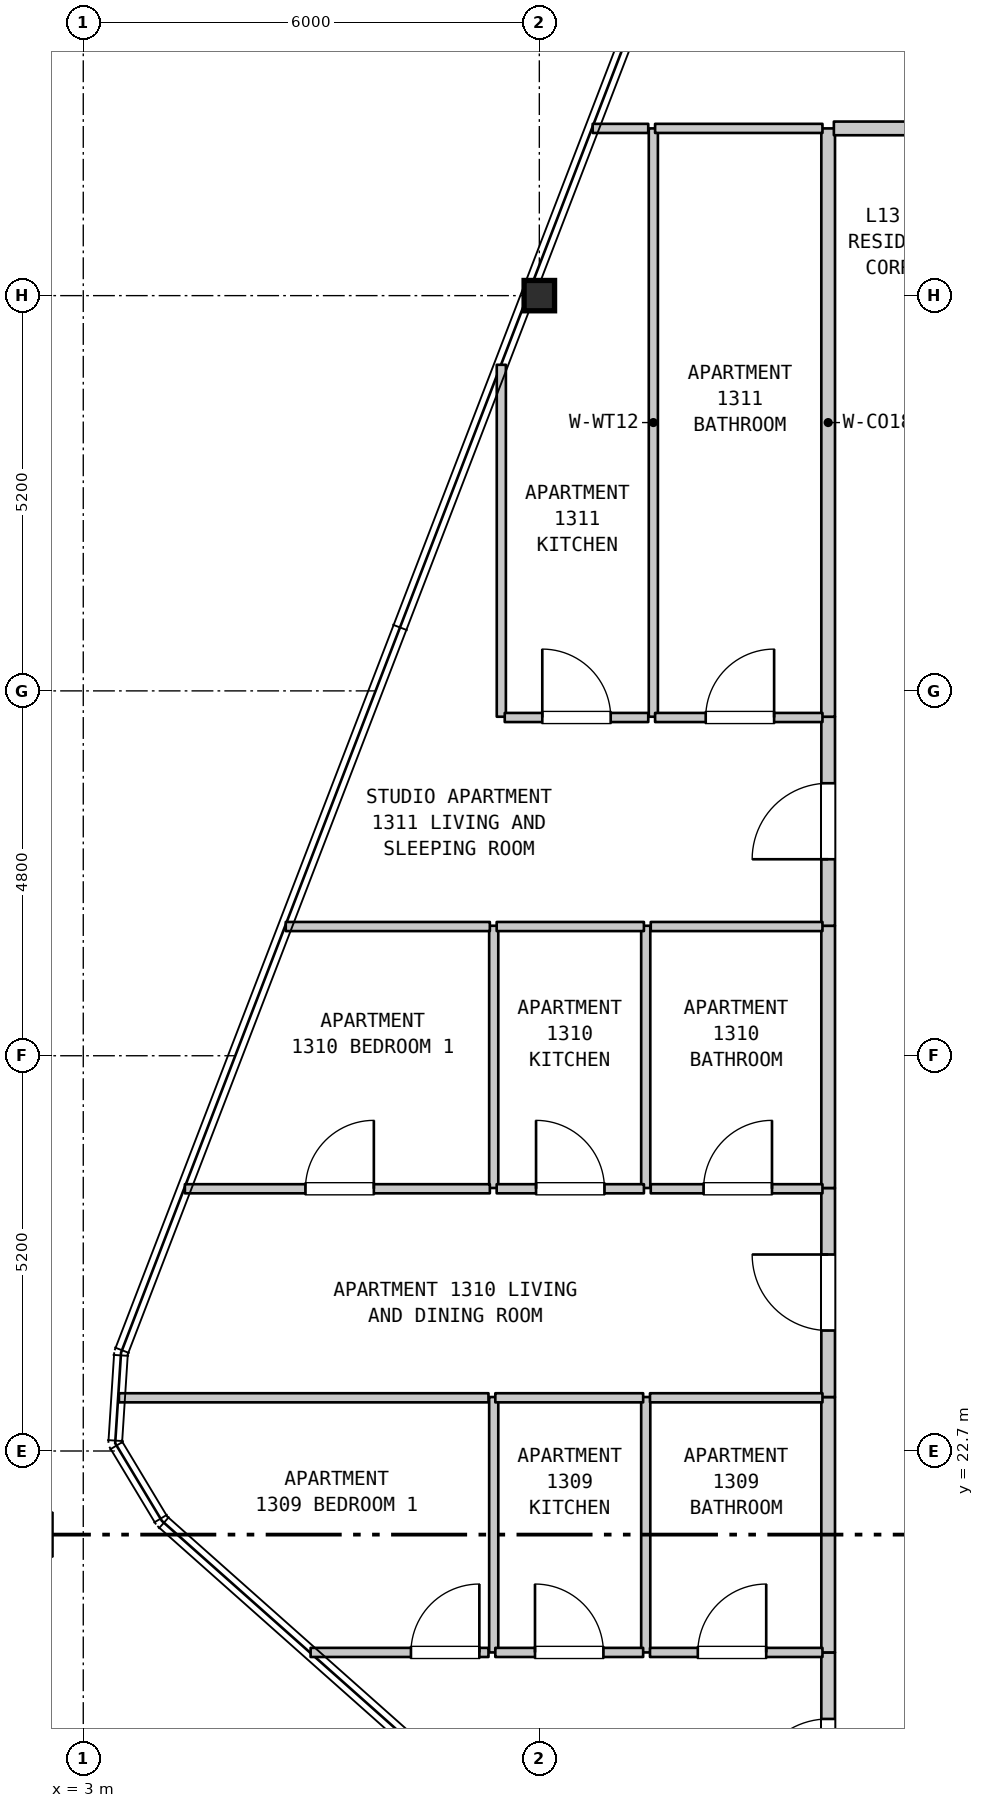
"""IFC4 building model, lengths in metres.
Left out: names, types, materials, properties, quantities, classifications, styles, units other than length and angle.
Written with IfcOpenShell. Run it as: python <this file> out.ifc"""

import sys

from ifc_helpers import new_model, si_unit, direction, frame, frame_2d, origin, origin_2d, place, context, subcontext, project, spatial, rectangle, i_section, extrude, element, fill, save


model = new_model("IFC4")
c1 = context("Model", 3, precision=1e-05, world=origin(), true_north=direction((0.0, 1.0)))
c2 = subcontext(c1, "Body", "Model", "MODEL_VIEW")
j1 = project(units=[si_unit("LENGTHUNIT", "METRE"), si_unit("PLANEANGLEUNIT", "RADIAN")], contexts=[c1])
p1 = place(None, origin())
s1 = spatial("IfcSite", under=j1, at=p1, CompositionType="ELEMENT")
p2 = place(p1, origin())
s2 = spatial("IfcBuilding", under=s1, at=p2, CompositionType="ELEMENT")
p3 = place(p2, frame((0.0, 0.0, 57.3)))
s3 = spatial("IfcBuildingStorey", under=s2, at=p3, CompositionType="ELEMENT", Elevation=57.3)
p4 = place(p3, frame((9.0, 37.9, 0.0), z_axis=(0.0, 0.0, 1.0), x_axis=(1.0, 0.0, 0.0)))
e1 = element("IfcColumn", 1, at=p4, inside=s3, PredefinedType="COLUMN", context=c2, shape_type="SweptSolid", body=[
    extrude(i_section(OverallWidth=0.401, OverallDepth=0.399, WebThickness=0.025, FlangeThickness=0.04, FilletRadius=0.015, at=origin_2d()), origin(), (0.0, 0.0, 1.0), 3.7),
])
p5 = place(p3, frame((8.4, 20.05, 0.0), z_axis=(0.0, 0.0, 1.0), x_axis=(0.0, 1.0, 0.0)))
e2 = element("IfcWall", 2, at=p5, inside=s3, PredefinedType="PARTITIONING", context=c2, shape_type="SweptSolid", body=[
    extrude(rectangle(XDim=3.36, YDim=0.12, at=frame_2d((1.68, 0.0))), origin(), (0.0, 0.0, 1.0), 3.28),
])
p6 = place(p3, frame((8.4, 26.16, 0.0), z_axis=(0.0, 0.0, 1.0), x_axis=(0.0, 1.0, 0.0)))
e3 = element("IfcWall", 3, at=p6, inside=s3, PredefinedType="PARTITIONING", context=c2, shape_type="SweptSolid", body=[
    extrude(rectangle(XDim=3.45, YDim=0.12, at=frame_2d((1.725, 0.0))), origin(), (0.0, 0.0, 1.0), 3.28),
])
p7 = place(p3, frame((8.5, 32.36, 0.0), z_axis=(0.0, 0.0, 1.0), x_axis=(0.0, 1.0, 0.0)))
e4 = element("IfcWall", 4, at=p7, inside=s3, PredefinedType="PARTITIONING", context=c2, shape_type="SweptSolid", body=[
    extrude(rectangle(XDim=4.63, YDim=0.12, at=frame_2d((2.315, 0.0))), origin(), (0.0, 0.0, 1.0), 3.28),
])
p8 = place(p3, frame((10.4, 20.05, 0.0), z_axis=(0.0, 0.0, 1.0), x_axis=(0.0, 1.0, 0.0)))
e5 = element("IfcWall", 5, at=p8, inside=s3, PredefinedType="PARTITIONING", context=c2, shape_type="SweptSolid", body=[
    extrude(rectangle(XDim=3.36, YDim=0.12, at=frame_2d((1.68, 0.0))), origin(), (0.0, 0.0, 1.0), 3.28),
])
p9 = place(p3, frame((10.4, 26.16, 0.0), z_axis=(0.0, 0.0, 1.0), x_axis=(0.0, 1.0, 0.0)))
e6 = element("IfcWall", 6, at=p9, inside=s3, PredefinedType="PARTITIONING", context=c2, shape_type="SweptSolid", body=[
    extrude(rectangle(XDim=3.45, YDim=0.12, at=frame_2d((1.725, 0.0))), origin(), (0.0, 0.0, 1.0), 3.28),
])
p10 = place(p3, frame((10.5, 32.36, 0.0), z_axis=(0.0, 0.0, 1.0), x_axis=(0.0, 1.0, 0.0)))
e7 = element("IfcWall", 7, at=p10, inside=s3, PredefinedType="PARTITIONING", context=c2, shape_type="SweptSolid", body=[
    extrude(rectangle(XDim=7.74, YDim=0.12, at=frame_2d((3.87, 0.0))), origin(), (0.0, 0.0, 1.0), 3.28),
])
p11 = place(p3, frame((12.8, 17.3, 0.0), z_axis=(0.0, 0.0, 1.0), x_axis=(0.0, 1.0, 0.0)))
e8 = element("IfcWall", 8, at=p11, inside=s3, PredefinedType="STANDARD", context=c2, shape_type="SweptSolid", body=[
    extrude(rectangle(XDim=2.75, YDim=0.18, at=frame_2d((1.375, 0.0))), origin(), (0.0, 0.0, 1.0), 3.28),
])
p12 = place(p11, frame((0.875, 0.0, 0.0)))
e9 = element("IfcOpeningElement", 9, at=p12, cuts=e8, PredefinedType="OPENING", context=c2, shape_type="SweptSolid", body=[
    extrude(rectangle(XDim=1.0, YDim=2.15, at=frame_2d((0.5, 1.075))), frame((0.0, 0.1, 0.0), z_axis=(0.0, -1.0, 0.0), x_axis=(1.0, 0.0, 0.0)), (0.0, 0.0, 1.0), 0.2),
])
p13 = place(p3, frame((12.8, 20.05, 0.0), z_axis=(0.0, 0.0, 1.0), x_axis=(0.0, 1.0, 0.0)))
e10 = element("IfcWall", 10, at=p13, inside=s3, PredefinedType="STANDARD", context=c2, shape_type="SweptSolid", body=[
    extrude(rectangle(XDim=3.36, YDim=0.18, at=frame_2d((1.68, 0.0))), origin(), (0.0, 0.0, 1.0), 3.28),
])
p14 = place(p3, frame((12.8, 23.41, 0.0), z_axis=(0.0, 0.0, 1.0), x_axis=(0.0, 1.0, 0.0)))
e11 = element("IfcWall", 11, at=p14, inside=s3, PredefinedType="STANDARD", context=c2, shape_type="SweptSolid", body=[
    extrude(rectangle(XDim=2.75, YDim=0.18, at=frame_2d((1.375, 0.0))), origin(), (0.0, 0.0, 1.0), 3.28),
])
p15 = place(p14, frame((0.875, 0.0, 0.0)))
e12 = element("IfcOpeningElement", 12, at=p15, cuts=e11, PredefinedType="OPENING", context=c2, shape_type="SweptSolid", body=[
    extrude(rectangle(XDim=1.0, YDim=2.15, at=frame_2d((0.5, 1.075))), frame((0.0, 0.1, 0.0), z_axis=(0.0, -1.0, 0.0), x_axis=(1.0, 0.0, 0.0)), (0.0, 0.0, 1.0), 0.2),
])
p16 = place(p3, frame((12.8, 26.16, 0.0), z_axis=(0.0, 0.0, 1.0), x_axis=(0.0, 1.0, 0.0)))
e13 = element("IfcWall", 13, at=p16, inside=s3, PredefinedType="STANDARD", context=c2, shape_type="SweptSolid", body=[
    extrude(rectangle(XDim=3.45, YDim=0.18, at=frame_2d((1.725, 0.0))), origin(), (0.0, 0.0, 1.0), 3.28),
])
p17 = place(p3, frame((12.8, 29.61, 0.0), z_axis=(0.0, 0.0, 1.0), x_axis=(0.0, 1.0, 0.0)))
e14 = element("IfcWall", 14, at=p17, inside=s3, PredefinedType="STANDARD", context=c2, shape_type="SweptSolid", body=[
    extrude(rectangle(XDim=2.75, YDim=0.18, at=frame_2d((1.375, 0.0))), origin(), (0.0, 0.0, 1.0), 3.28),
])
p18 = place(p17, frame((0.875, 0.0, 0.0)))
e15 = element("IfcOpeningElement", 15, at=p18, cuts=e14, PredefinedType="OPENING", context=c2, shape_type="SweptSolid", body=[
    extrude(rectangle(XDim=1.0, YDim=2.15, at=frame_2d((0.5, 1.075))), frame((0.0, 0.1, 0.0), z_axis=(0.0, -1.0, 0.0), x_axis=(1.0, 0.0, 0.0)), (0.0, 0.0, 1.0), 0.2),
])
p19 = place(p3, frame((12.8, 32.36, 0.0), z_axis=(0.0, 0.0, 1.0), x_axis=(0.0, 1.0, 0.0)))
e16 = element("IfcWall", 16, at=p19, inside=s3, PredefinedType="STANDARD", context=c2, shape_type="SweptSolid", body=[
    extrude(rectangle(XDim=7.74, YDim=0.18, at=frame_2d((3.87, 0.0))), origin(), (0.0, 0.0, 1.0), 3.28),
])
p20 = place(p3, frame((5.991, 20.05, 0.0), z_axis=(0.0, 0.0, 1.0), x_axis=(1.0, 0.0, 0.0)))
e17 = element("IfcWall", 17, at=p20, inside=s3, PredefinedType="PARTITIONING", context=c2, shape_type="SweptSolid", body=[
    extrude(rectangle(XDim=2.34, YDim=0.12, at=frame_2d((1.17, 0.0))), origin(), (0.0, 0.0, 1.0), 3.28),
])
p21 = place(p20, frame((1.32, 0.0, 0.0)))
e18 = element("IfcOpeningElement", 18, at=p21, cuts=e17, PredefinedType="OPENING", context=c2, shape_type="SweptSolid", body=[
    extrude(rectangle(XDim=0.9, YDim=2.15, at=frame_2d((0.45, 1.075))), frame((0.0, 0.07, 0.0), z_axis=(0.0, -1.0, 0.0), x_axis=(1.0, 0.0, 0.0)), (0.0, 0.0, 1.0), 0.14),
])
p22 = place(p3, frame((8.421, 20.05, 0.0), z_axis=(0.0, 0.0, 1.0), x_axis=(1.0, 0.0, 0.0)))
e19 = element("IfcWall", 19, at=p22, inside=s3, PredefinedType="PARTITIONING", context=c2, shape_type="SweptSolid", body=[
    extrude(rectangle(XDim=1.945, YDim=0.12, at=frame_2d((0.973, 0.0))), origin(), (0.0, 0.0, 1.0), 3.28),
])
p23 = place(p22, frame((0.522, 0.0, 0.0)))
e20 = element("IfcOpeningElement", 20, at=p23, cuts=e19, PredefinedType="OPENING", context=c2, shape_type="SweptSolid", body=[
    extrude(rectangle(XDim=0.9, YDim=2.15, at=frame_2d((0.45, 1.075))), frame((0.0, 0.07, 0.0), z_axis=(0.0, -1.0, 0.0), x_axis=(1.0, 0.0, 0.0)), (0.0, 0.0, 1.0), 0.14),
])
p24 = place(p3, frame((10.456, 20.05, 0.0), z_axis=(0.0, 0.0, 1.0), x_axis=(1.0, 0.0, 0.0)))
e21 = element("IfcWall", 21, at=p24, inside=s3, PredefinedType="PARTITIONING", context=c2, shape_type="SweptSolid", body=[
    extrude(rectangle(XDim=2.269, YDim=0.12, at=frame_2d((1.135, 0.0))), origin(), (0.0, 0.0, 1.0), 3.28),
])
p25 = place(p24, frame((0.629, 0.0, 0.0)))
e22 = element("IfcOpeningElement", 22, at=p25, cuts=e21, PredefinedType="OPENING", context=c2, shape_type="SweptSolid", body=[
    extrude(rectangle(XDim=0.9, YDim=2.1, at=frame_2d((0.45, 1.05))), frame((0.0, 0.07, 0.0), z_axis=(0.0, -1.0, 0.0), x_axis=(1.0, 0.0, 0.0)), (0.0, 0.0, 1.0), 0.14),
])
p26 = place(p3, frame((3.469, 23.4, 0.0), z_axis=(0.0, 0.0, 1.0), x_axis=(1.0, 0.0, 0.0)))
e23 = element("IfcWall", 23, at=p26, inside=s3, PredefinedType="PARTITIONING", context=c2, shape_type="SweptSolid", body=[
    extrude(rectangle(XDim=4.862, YDim=0.12, at=frame_2d((2.431, 0.0))), origin(), (0.0, 0.0, 1.0), 3.28),
])
p27 = place(p3, frame((8.421, 23.4, 0.0), z_axis=(0.0, 0.0, 1.0), x_axis=(1.0, 0.0, 0.0)))
e24 = element("IfcWall", 24, at=p27, inside=s3, PredefinedType="PARTITIONING", context=c2, shape_type="SweptSolid", body=[
    extrude(rectangle(XDim=1.945, YDim=0.12, at=frame_2d((0.973, 0.0))), origin(), (0.0, 0.0, 1.0), 3.28),
])
p28 = place(p3, frame((10.456, 23.4, 0.0), z_axis=(0.0, 0.0, 1.0), x_axis=(1.0, 0.0, 0.0)))
e25 = element("IfcWall", 25, at=p28, inside=s3, PredefinedType="PARTITIONING", context=c2, shape_type="SweptSolid", body=[
    extrude(rectangle(XDim=2.269, YDim=0.12, at=frame_2d((1.135, 0.0))), origin(), (0.0, 0.0, 1.0), 3.28),
])
p29 = place(p3, frame((4.337, 26.15, 0.0), z_axis=(0.0, 0.0, 1.0), x_axis=(1.0, 0.0, 0.0)))
e26 = element("IfcWall", 26, at=p29, inside=s3, PredefinedType="PARTITIONING", context=c2, shape_type="SweptSolid", body=[
    extrude(rectangle(XDim=4.012, YDim=0.12, at=frame_2d((2.006, 0.0))), origin(), (0.0, 0.0, 1.0), 3.28),
])
p30 = place(p29, frame((1.586, 0.0, 0.0)))
e27 = element("IfcOpeningElement", 27, at=p30, cuts=e26, PredefinedType="OPENING", context=c2, shape_type="SweptSolid", body=[
    extrude(rectangle(XDim=0.9, YDim=2.15, at=frame_2d((0.45, 1.075))), frame((0.0, 0.07, 0.0), z_axis=(0.0, -1.0, 0.0), x_axis=(1.0, 0.0, 0.0)), (0.0, 0.0, 1.0), 0.14),
])
p31 = place(p3, frame((8.439, 26.15, 0.0), z_axis=(0.0, 0.0, 1.0), x_axis=(1.0, 0.0, 0.0)))
e28 = element("IfcWall", 28, at=p31, inside=s3, PredefinedType="PARTITIONING", context=c2, shape_type="SweptSolid", body=[
    extrude(rectangle(XDim=1.937, YDim=0.12, at=frame_2d((0.969, 0.0))), origin(), (0.0, 0.0, 1.0), 3.28),
])
p32 = place(p31, frame((0.518, 0.0, 0.0)))
e29 = element("IfcOpeningElement", 29, at=p32, cuts=e28, PredefinedType="OPENING", context=c2, shape_type="SweptSolid", body=[
    extrude(rectangle(XDim=0.9, YDim=2.15, at=frame_2d((0.45, 1.075))), frame((0.0, 0.07, 0.0), z_axis=(0.0, -1.0, 0.0), x_axis=(1.0, 0.0, 0.0)), (0.0, 0.0, 1.0), 0.14),
])
p33 = place(p3, frame((10.466, 26.15, 0.0), z_axis=(0.0, 0.0, 1.0), x_axis=(1.0, 0.0, 0.0)))
e30 = element("IfcWall", 30, at=p33, inside=s3, PredefinedType="PARTITIONING", context=c2, shape_type="SweptSolid", body=[
    extrude(rectangle(XDim=2.259, YDim=0.12, at=frame_2d((1.129, 0.0))), origin(), (0.0, 0.0, 1.0), 3.28),
])
p34 = place(p33, frame((0.695, 0.0, 0.0)))
e31 = element("IfcOpeningElement", 31, at=p34, cuts=e30, PredefinedType="OPENING", context=c2, shape_type="SweptSolid", body=[
    extrude(rectangle(XDim=0.9, YDim=2.1, at=frame_2d((0.45, 1.05))), frame((0.0, 0.07, 0.0), z_axis=(0.0, -1.0, 0.0), x_axis=(1.0, 0.0, 0.0)), (0.0, 0.0, 1.0), 0.14),
])
p35 = place(p3, frame((5.664, 29.6, 0.0), z_axis=(0.0, 0.0, 1.0), x_axis=(1.0, 0.0, 0.0)))
e32 = element("IfcWall", 32, at=p35, inside=s3, PredefinedType="PARTITIONING", context=c2, shape_type="SweptSolid", body=[
    extrude(rectangle(XDim=2.685, YDim=0.12, at=frame_2d((1.343, 0.0))), origin(), (0.0, 0.0, 1.0), 3.28),
])
p36 = place(p3, frame((8.439, 29.6, 0.0), z_axis=(0.0, 0.0, 1.0), x_axis=(1.0, 0.0, 0.0)))
e33 = element("IfcWall", 33, at=p36, inside=s3, PredefinedType="PARTITIONING", context=c2, shape_type="SweptSolid", body=[
    extrude(rectangle(XDim=1.937, YDim=0.12, at=frame_2d((0.969, 0.0))), origin(), (0.0, 0.0, 1.0), 3.28),
])
p37 = place(p3, frame((10.466, 29.6, 0.0), z_axis=(0.0, 0.0, 1.0), x_axis=(1.0, 0.0, 0.0)))
e34 = element("IfcWall", 34, at=p37, inside=s3, PredefinedType="PARTITIONING", context=c2, shape_type="SweptSolid", body=[
    extrude(rectangle(XDim=2.259, YDim=0.12, at=frame_2d((1.129, 0.0))), origin(), (0.0, 0.0, 1.0), 3.28),
])
p38 = place(p3, frame((8.545, 32.35, 0.0), z_axis=(0.0, 0.0, 1.0), x_axis=(1.0, 0.0, 0.0)))
e35 = element("IfcWall", 35, at=p38, inside=s3, PredefinedType="PARTITIONING", context=c2, shape_type="SweptSolid", body=[
    extrude(rectangle(XDim=1.888, YDim=0.12, at=frame_2d((0.944, 0.0))), origin(), (0.0, 0.0, 1.0), 3.28),
])
p39 = place(p38, frame((0.494, 0.0, 0.0)))
e36 = element("IfcOpeningElement", 36, at=p39, cuts=e35, PredefinedType="OPENING", context=c2, shape_type="SweptSolid", body=[
    extrude(rectangle(XDim=0.9, YDim=2.15, at=frame_2d((0.45, 1.075))), frame((0.0, 0.07, 0.0), z_axis=(0.0, -1.0, 0.0), x_axis=(1.0, 0.0, 0.0)), (0.0, 0.0, 1.0), 0.14),
])
p40 = place(p3, frame((10.523, 32.35, 0.0), z_axis=(0.0, 0.0, 1.0), x_axis=(1.0, 0.0, 0.0)))
e37 = element("IfcWall", 37, at=p40, inside=s3, PredefinedType="PARTITIONING", context=c2, shape_type="SweptSolid", body=[
    extrude(rectangle(XDim=2.202, YDim=0.12, at=frame_2d((1.101, 0.0))), origin(), (0.0, 0.0, 1.0), 3.28),
])
p41 = place(p40, frame((0.666, 0.0, 0.0)))
e38 = element("IfcOpeningElement", 38, at=p41, cuts=e37, PredefinedType="OPENING", context=c2, shape_type="SweptSolid", body=[
    extrude(rectangle(XDim=0.9, YDim=2.1, at=frame_2d((0.45, 1.05))), frame((0.0, 0.07, 0.0), z_axis=(0.0, -1.0, 0.0), x_axis=(1.0, 0.0, 0.0)), (0.0, 0.0, 1.0), 0.14),
])
p42 = place(p3, frame((9.702, 40.1, 0.0), z_axis=(0.0, 0.0, 1.0), x_axis=(1.0, 0.0, 0.0)))
e39 = element("IfcWall", 39, at=p42, inside=s3, PredefinedType="PARTITIONING", context=c2, shape_type="SweptSolid", body=[
    extrude(rectangle(XDim=0.731, YDim=0.12, at=frame_2d((0.366, 0.0))), origin(), (0.0, 0.0, 1.0), 3.28),
])
p43 = place(p3, frame((10.523, 40.1, 0.0), z_axis=(0.0, 0.0, 1.0), x_axis=(1.0, 0.0, 0.0)))
e40 = element("IfcWall", 40, at=p43, inside=s3, PredefinedType="PARTITIONING", context=c2, shape_type="SweptSolid", body=[
    extrude(rectangle(XDim=2.202, YDim=0.12, at=frame_2d((1.101, 0.0))), origin(), (0.0, 0.0, 1.0), 3.28),
])
p44 = place(p3, frame((12.875, 40.1, 0.0), z_axis=(0.0, 0.0, 1.0), x_axis=(1.0, 0.0, 0.0)))
e41 = element("IfcWall", 41, at=p44, inside=s3, PredefinedType="STANDARD", context=c2, shape_type="SweptSolid", body=[
    extrude(rectangle(XDim=3.23, YDim=0.18, at=frame_2d((1.615, 0.0))), origin(), (0.0, 0.0, 1.0), 3.28),
])
p45 = place(p44, frame((1.029, 0.0, 0.0)))
e42 = element("IfcOpeningElement", 42, at=p45, cuts=e41, PredefinedType="OPENING", context=c2, shape_type="SweptSolid", body=[
    extrude(rectangle(XDim=1.0, YDim=2.15, at=frame_2d((0.5, 1.075))), frame((0.0, 0.1, 0.0), z_axis=(0.0, -1.0, 0.0), x_axis=(1.0, 0.0, 0.0)), (0.0, 0.0, 1.0), 0.2),
])
p46 = place(p12, origin())
e43 = element("IfcDoor", 43, at=p46, inside=s3, OperationType="SINGLE_SWING_LEFT", PredefinedType="DOOR", context=c2, shape_type="SweptSolid", body=[
    extrude(rectangle(XDim=1.0, YDim=2.15, at=frame_2d((0.5, 1.075))), frame((0.0, 0.025, 0.0), z_axis=(0.0, -1.0, 0.0), x_axis=(1.0, 0.0, 0.0)), (0.0, 0.0, 1.0), 0.05),
])
fill(e9, e43)
p47 = place(p15, origin())
e44 = element("IfcDoor", 44, at=p47, inside=s3, OperationType="SINGLE_SWING_RIGHT", PredefinedType="DOOR", context=c2, shape_type="SweptSolid", body=[
    extrude(rectangle(XDim=1.0, YDim=2.15, at=frame_2d((0.5, 1.075))), frame((0.0, 0.025, 0.0), z_axis=(0.0, -1.0, 0.0), x_axis=(1.0, 0.0, 0.0)), (0.0, 0.0, 1.0), 0.05),
])
fill(e12, e44)
p48 = place(p18, origin())
e45 = element("IfcDoor", 45, at=p48, inside=s3, OperationType="SINGLE_SWING_LEFT", PredefinedType="DOOR", context=c2, shape_type="SweptSolid", body=[
    extrude(rectangle(XDim=1.0, YDim=2.15, at=frame_2d((0.5, 1.075))), frame((0.0, 0.025, 0.0), z_axis=(0.0, -1.0, 0.0), x_axis=(1.0, 0.0, 0.0)), (0.0, 0.0, 1.0), 0.05),
])
fill(e15, e45)
p49 = place(p21, origin())
e46 = element("IfcDoor", 46, at=p49, inside=s3, OperationType="SINGLE_SWING_RIGHT", PredefinedType="DOOR", context=c2, shape_type="SweptSolid", body=[
    extrude(rectangle(XDim=0.9, YDim=2.15, at=frame_2d((0.45, 1.075))), frame((0.0, 0.025, 0.0), z_axis=(0.0, -1.0, 0.0), x_axis=(1.0, 0.0, 0.0)), (0.0, 0.0, 1.0), 0.05),
])
fill(e18, e46)
p50 = place(p23, origin())
e47 = element("IfcDoor", 47, at=p50, inside=s3, OperationType="SINGLE_SWING_LEFT", PredefinedType="DOOR", context=c2, shape_type="SweptSolid", body=[
    extrude(rectangle(XDim=0.9, YDim=2.15, at=frame_2d((0.45, 1.075))), frame((0.0, 0.025, 0.0), z_axis=(0.0, -1.0, 0.0), x_axis=(1.0, 0.0, 0.0)), (0.0, 0.0, 1.0), 0.05),
])
fill(e20, e47)
p51 = place(p25, origin())
e48 = element("IfcDoor", 48, at=p51, inside=s3, OperationType="SINGLE_SWING_RIGHT", PredefinedType="DOOR", context=c2, shape_type="SweptSolid", body=[
    extrude(rectangle(XDim=0.9, YDim=2.1, at=frame_2d((0.45, 1.05))), frame((0.0, 0.025, 0.0), z_axis=(0.0, -1.0, 0.0), x_axis=(1.0, 0.0, 0.0)), (0.0, 0.0, 1.0), 0.05),
])
fill(e22, e48)
p52 = place(p30, origin())
e49 = element("IfcDoor", 49, at=p52, inside=s3, OperationType="SINGLE_SWING_RIGHT", PredefinedType="DOOR", context=c2, shape_type="SweptSolid", body=[
    extrude(rectangle(XDim=0.9, YDim=2.15, at=frame_2d((0.45, 1.075))), frame((0.0, 0.025, 0.0), z_axis=(0.0, -1.0, 0.0), x_axis=(1.0, 0.0, 0.0)), (0.0, 0.0, 1.0), 0.05),
])
fill(e27, e49)
p53 = place(p32, origin())
e50 = element("IfcDoor", 50, at=p53, inside=s3, OperationType="SINGLE_SWING_LEFT", PredefinedType="DOOR", context=c2, shape_type="SweptSolid", body=[
    extrude(rectangle(XDim=0.9, YDim=2.15, at=frame_2d((0.45, 1.075))), frame((0.0, 0.025, 0.0), z_axis=(0.0, -1.0, 0.0), x_axis=(1.0, 0.0, 0.0)), (0.0, 0.0, 1.0), 0.05),
])
fill(e29, e50)
p54 = place(p34, origin())
e51 = element("IfcDoor", 51, at=p54, inside=s3, OperationType="SINGLE_SWING_RIGHT", PredefinedType="DOOR", context=c2, shape_type="SweptSolid", body=[
    extrude(rectangle(XDim=0.9, YDim=2.1, at=frame_2d((0.45, 1.05))), frame((0.0, 0.025, 0.0), z_axis=(0.0, -1.0, 0.0), x_axis=(1.0, 0.0, 0.0)), (0.0, 0.0, 1.0), 0.05),
])
fill(e31, e51)
p55 = place(p39, origin())
e52 = element("IfcDoor", 52, at=p55, inside=s3, OperationType="SINGLE_SWING_LEFT", PredefinedType="DOOR", context=c2, shape_type="SweptSolid", body=[
    extrude(rectangle(XDim=0.9, YDim=2.15, at=frame_2d((0.45, 1.075))), frame((0.0, 0.025, 0.0), z_axis=(0.0, -1.0, 0.0), x_axis=(1.0, 0.0, 0.0)), (0.0, 0.0, 1.0), 0.05),
])
fill(e36, e52)
p56 = place(p41, origin())
e53 = element("IfcDoor", 53, at=p56, inside=s3, OperationType="SINGLE_SWING_RIGHT", PredefinedType="DOOR", context=c2, shape_type="SweptSolid", body=[
    extrude(rectangle(XDim=0.9, YDim=2.1, at=frame_2d((0.45, 1.05))), frame((0.0, 0.025, 0.0), z_axis=(0.0, -1.0, 0.0), x_axis=(1.0, 0.0, 0.0)), (0.0, 0.0, 1.0), 0.05),
])
fill(e38, e53)
save(model, sys.argv[1])
